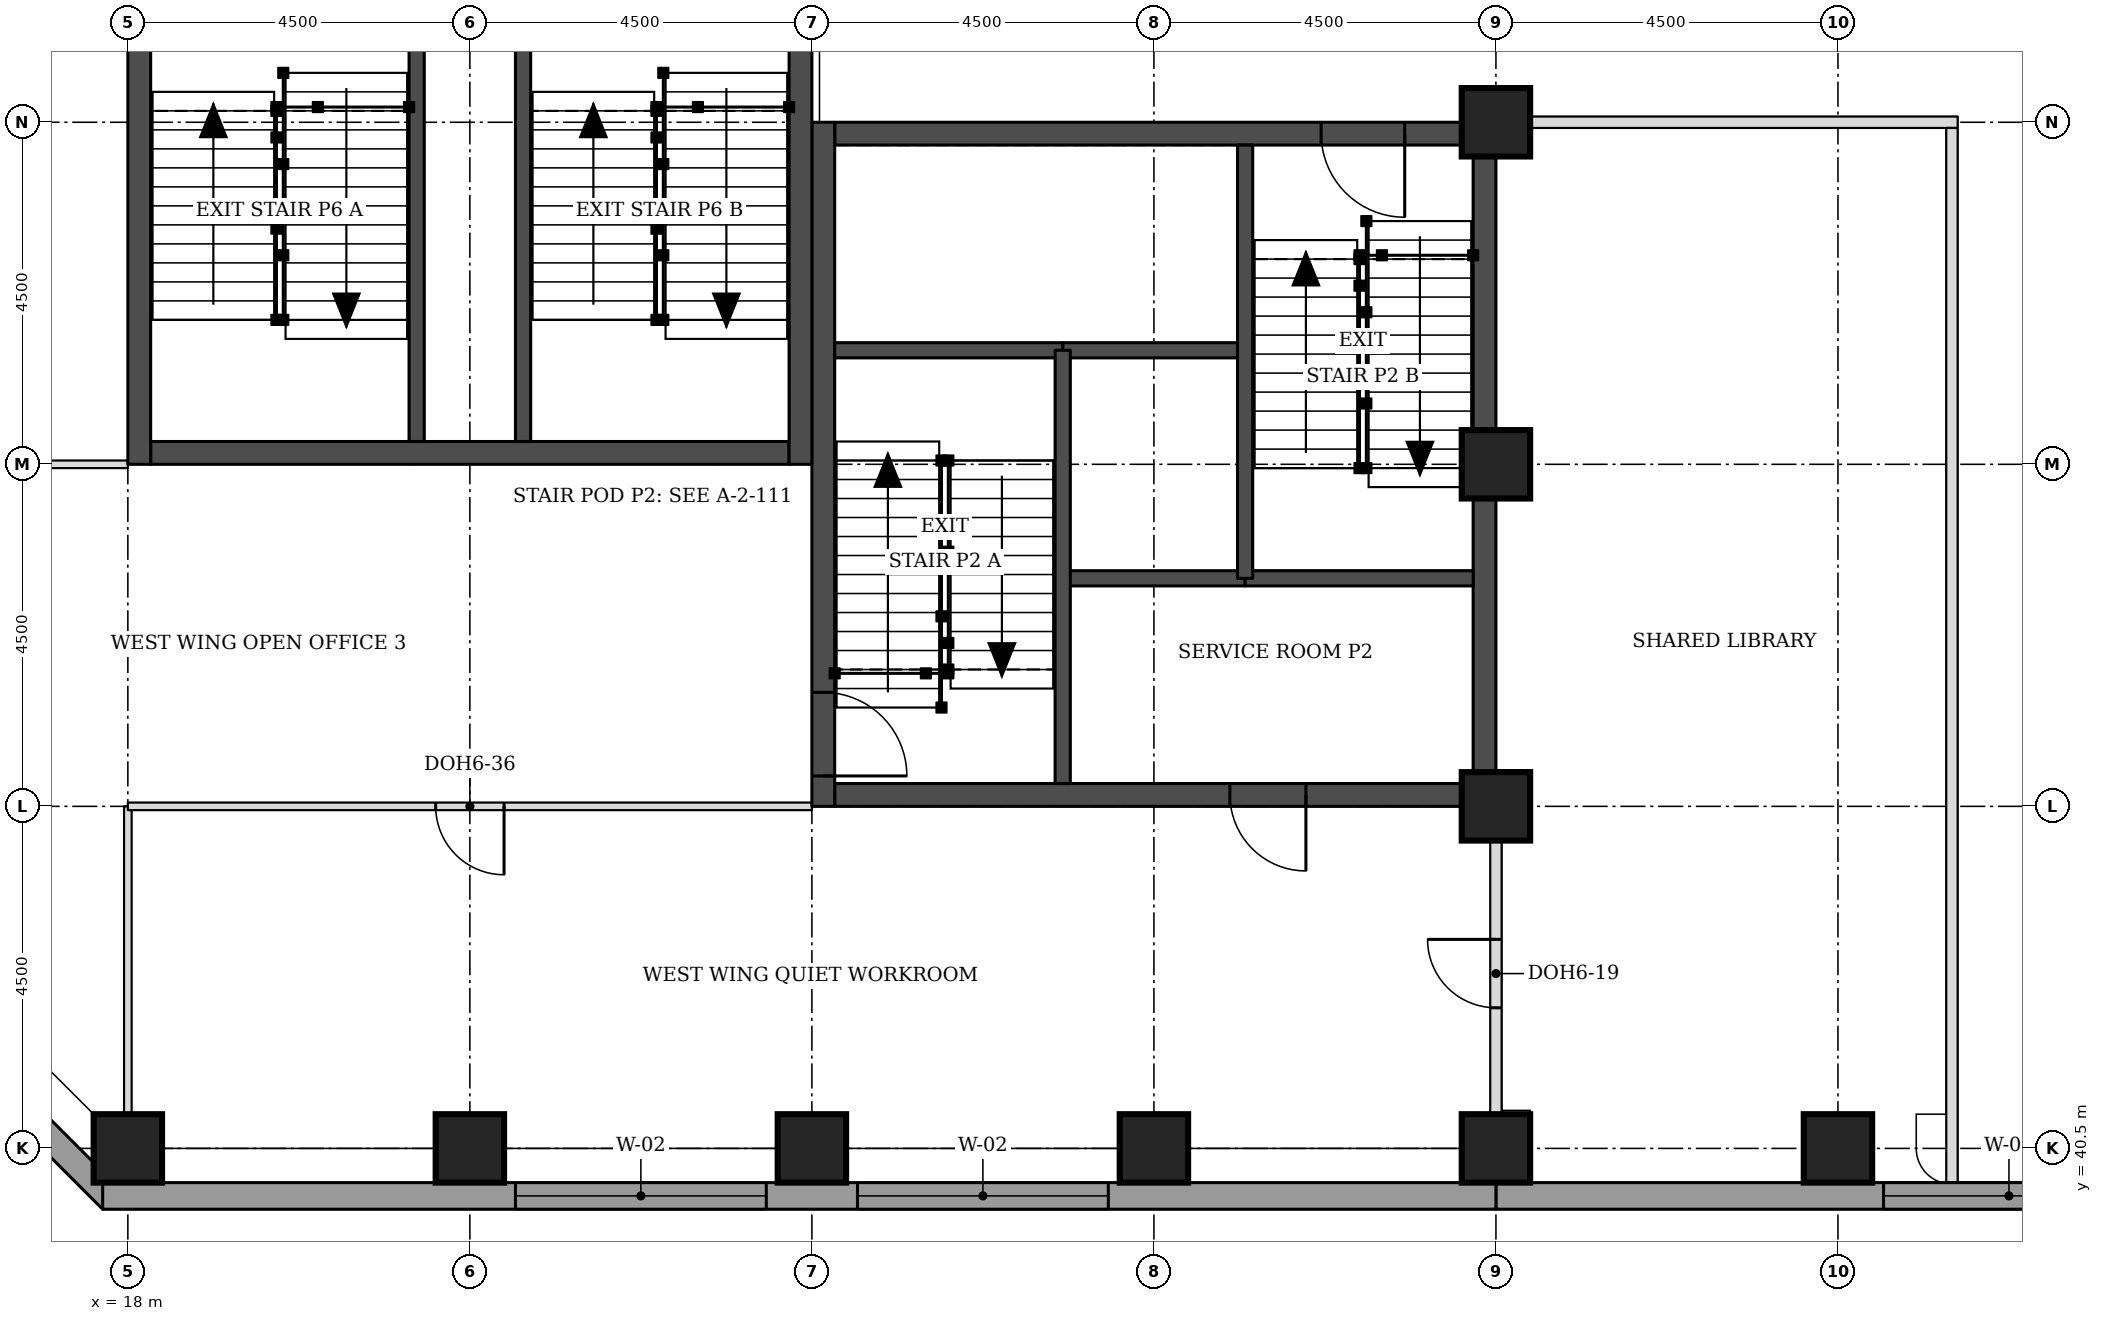
"""IFC4 building model, lengths in metres.
Left out: names, types, materials, properties, quantities, classifications, styles, units other than length and angle.
Written with IfcOpenShell. Run it as: python <this file> out.ifc"""

import sys

from ifc_helpers import new_model, si_unit, direction, frame, frame_2d, origin, origin_2d, place, context, subcontext, project, spatial, rectangle, extrude, element, fill, save


model = new_model("IFC4")
c1 = context("Model", 3, precision=1e-05, world=origin(), true_north=direction((0.0, 1.0)))
c2 = subcontext(c1, "Body", "Model", "MODEL_VIEW")
j1 = project(units=[si_unit("LENGTHUNIT", "METRE"), si_unit("PLANEANGLEUNIT", "RADIAN")], contexts=[c1])
p1 = place(None, origin())
s1 = spatial("IfcSite", under=j1, at=p1, CompositionType="ELEMENT")
p2 = place(p1, origin())
s2 = spatial("IfcBuilding", under=s1, at=p2, CompositionType="ELEMENT")
p3 = place(p2, frame((0.0, 0.0, 184.7)))
s3 = spatial("IfcBuildingStorey", under=s2, at=p3, CompositionType="ELEMENT", Elevation=184.7)
for number, where, z_axis, x_axis in (
    (1, (18.0, 40.5, 0.0), (0.0, 0.0, 1.0), (1.0, 0.0, 0.0)),
    (2, (22.5, 40.5, 0.0), (0.0, 0.0, 1.0), (1.0, 0.0, 0.0)),
    (3, (27.0, 40.5, 0.0), (0.0, 0.0, 1.0), (1.0, 0.0, 0.0)),
    (4, (31.5, 40.5, 0.0), (0.0, 0.0, 1.0), (1.0, 0.0, 0.0)),
    (5, (36.0, 40.5, 0.0), (0.0, 0.0, 1.0), (1.0, 0.0, 0.0)),
    (6, (40.5, 40.5, 0.0), (0.0, 0.0, 1.0), (1.0, 0.0, 0.0)),
    (7, (36.0, 45.0, 0.0), (0.0, 0.0, 1.0), (1.0, 0.0, 0.0)),
    (8, (36.0, 49.5, 0.0), (0.0, 0.0, 1.0), (1.0, 0.0, 0.0)),
    (9, (36.0, 54.0, 0.0), (0.0, 0.0, 1.0), (1.0, 0.0, 0.0)),
):
    element("IfcColumn", number, at=place(p3, frame(where, z_axis=z_axis, x_axis=x_axis)), inside=s3, PredefinedType="COLUMN", context=c2, shape_type="SweptSolid", body=[
        extrude(rectangle(XDim=0.9, YDim=0.9, at=origin_2d()), origin(), (0.0, 0.0, 1.0), 3.7),
    ])
p4 = place(p3, frame((27.3, 45.15, 0.0), z_axis=(0.0, 0.0, 1.0), x_axis=(1.0, 0.0, 0.0)))
e10 = element("IfcWall", 10, at=p4, inside=s3, PredefinedType="SHEAR", context=c2, shape_type="SweptSolid", body=[
    extrude(rectangle(XDim=8.4, YDim=0.3, at=frame_2d((4.2, 0.0))), origin(), (0.0, 0.0, 1.0), 3.7),
])
p5 = place(p4, frame((5.2, 0.0, 0.0)))
e11 = element("IfcOpeningElement", 11, at=p5, cuts=e10, PredefinedType="OPENING", context=c2, shape_type="SweptSolid", body=[
    extrude(rectangle(XDim=1.0, YDim=2.1, at=frame_2d((0.5, 1.05))), frame((0.0, 0.16, 0.0), z_axis=(0.0, -1.0, 0.0), x_axis=(1.0, 0.0, 0.0)), (0.0, 0.0, 1.0), 0.32),
])
p6 = place(p3, frame((27.3, 53.85, 0.0), z_axis=(0.0, 0.0, 1.0), x_axis=(1.0, 0.0, 0.0)))
e12 = element("IfcWall", 12, at=p6, inside=s3, PredefinedType="SHEAR", context=c2, shape_type="SweptSolid", body=[
    extrude(rectangle(XDim=8.4, YDim=0.3, at=frame_2d((4.2, 0.0))), origin(), (0.0, 0.0, 1.0), 3.7),
])
p7 = place(p6, frame((6.4, 0.0, 0.0)))
e13 = element("IfcOpeningElement", 13, at=p7, cuts=e12, PredefinedType="OPENING", context=c2, shape_type="SweptSolid", body=[
    extrude(rectangle(XDim=1.1, YDim=2.1, at=frame_2d((0.55, 1.05))), frame((0.0, 0.16, 0.0), z_axis=(0.0, -1.0, 0.0), x_axis=(1.0, 0.0, 0.0)), (0.0, 0.0, 1.0), 0.32),
])
p8 = place(p3, frame((27.15, 45.0, 0.0), z_axis=(0.0, 0.0, 1.0), x_axis=(0.0, 1.0, 0.0)))
e14 = element("IfcWall", 14, at=p8, inside=s3, PredefinedType="SHEAR", context=c2, shape_type="SweptSolid", body=[
    extrude(rectangle(XDim=9.0, YDim=0.3, at=frame_2d((4.5, 0.0))), origin(), (0.0, 0.0, 1.0), 3.7),
])
p9 = place(p8, frame((0.4, 0.0, 0.0)))
e15 = element("IfcOpeningElement", 15, at=p9, cuts=e14, PredefinedType="OPENING", context=c2, shape_type="SweptSolid", body=[
    extrude(rectangle(XDim=1.1, YDim=2.1, at=frame_2d((0.55, 1.05))), frame((0.0, 0.16, 0.0), z_axis=(0.0, -1.0, 0.0), x_axis=(1.0, 0.0, 0.0)), (0.0, 0.0, 1.0), 0.32),
])
p10 = place(p3, frame((35.85, 45.0, 0.0), z_axis=(0.0, 0.0, 1.0), x_axis=(0.0, 1.0, 0.0)))
e16 = element("IfcWall", 16, at=p10, inside=s3, PredefinedType="SHEAR", context=c2, shape_type="SweptSolid", body=[
    extrude(rectangle(XDim=9.0, YDim=0.3, at=frame_2d((4.5, 0.0))), origin(), (0.0, 0.0, 1.0), 3.7),
])
p11 = place(p3, frame((18.3, 49.65, 0.0), z_axis=(0.0, 0.0, 1.0), x_axis=(1.0, 0.0, 0.0)))
e17 = element("IfcWall", 17, at=p11, inside=s3, PredefinedType="SHEAR", context=c2, shape_type="SweptSolid", body=[
    extrude(rectangle(XDim=8.4, YDim=0.3, at=frame_2d((4.2, 0.0))), origin(), (0.0, 0.0, 1.0), 3.7),
])
p12 = place(p3, frame((18.15, 49.5, 0.0), z_axis=(0.0, 0.0, 1.0), x_axis=(0.0, 1.0, 0.0)))
e18 = element("IfcWall", 18, at=p12, inside=s3, PredefinedType="SHEAR", context=c2, shape_type="SweptSolid", body=[
    extrude(rectangle(XDim=9.0, YDim=0.3, at=frame_2d((4.5, 0.0))), origin(), (0.0, 0.0, 1.0), 3.7),
])
p13 = place(p3, frame((26.85, 49.5, 0.0), z_axis=(0.0, 0.0, 1.0), x_axis=(0.0, 1.0, 0.0)))
e19 = element("IfcWall", 19, at=p13, inside=s3, PredefinedType="SHEAR", context=c2, shape_type="SweptSolid", body=[
    extrude(rectangle(XDim=9.0, YDim=0.3, at=frame_2d((4.5, 0.0))), origin(), (0.0, 0.0, 1.0), 3.7),
])
p14 = place(p13, frame((6.6, 0.0, 0.0)))
e20 = element("IfcOpeningElement", 20, at=p14, cuts=e19, PredefinedType="OPENING", context=c2, shape_type="SweptSolid", body=[
    extrude(rectangle(XDim=1.8, YDim=2.1, at=frame_2d((0.9, 1.05))), frame((0.0, 0.16, 0.0), z_axis=(0.0, -1.0, 0.0), x_axis=(1.0, 0.0, 0.0)), (0.0, 0.0, 1.0), 0.32),
])
p15 = place(p3, frame((36.0, 39.875, 0.0), z_axis=(0.0, 0.0, 1.0), x_axis=(1.0, 0.0, 0.0)))
e21 = element("IfcWall", 21, at=p15, inside=s3, PredefinedType="STANDARD", context=c2, shape_type="SweptSolid", body=[
    extrude(rectangle(XDim=36.331, YDim=0.35, at=frame_2d((18.166, 0.0))), origin(), (0.0, 0.0, 1.0), 3.525),
])
p16 = place(p15, frame((5.1, 0.0, 0.9)))
e22 = element("IfcOpeningElement", 22, at=p16, cuts=e21, PredefinedType="OPENING", context=c2, shape_type="SweptSolid", body=[
    extrude(rectangle(XDim=3.3, YDim=1.9, at=frame_2d((1.65, 0.95))), frame((0.0, 0.185, 0.0), z_axis=(0.0, -1.0, 0.0), x_axis=(1.0, 0.0, 0.0)), (0.0, 0.0, 1.0), 0.37),
])
p17 = place(p15, frame((9.6, 0.0, 0.9)))
e23 = element("IfcOpeningElement", 23, at=p17, cuts=e21, PredefinedType="OPENING", context=c2, shape_type="SweptSolid", body=[
    extrude(rectangle(XDim=3.3, YDim=1.9, at=frame_2d((1.65, 0.95))), frame((0.0, 0.185, 0.0), z_axis=(0.0, -1.0, 0.0), x_axis=(1.0, 0.0, 0.0)), (0.0, 0.0, 1.0), 0.37),
])
p18 = place(p15, frame((14.1, 0.0, 0.9)))
e24 = element("IfcOpeningElement", 24, at=p18, cuts=e21, PredefinedType="OPENING", context=c2, shape_type="SweptSolid", body=[
    extrude(rectangle(XDim=3.3, YDim=1.9, at=frame_2d((1.65, 0.95))), frame((0.0, 0.185, 0.0), z_axis=(0.0, -1.0, 0.0), x_axis=(1.0, 0.0, 0.0)), (0.0, 0.0, 1.0), 0.37),
])
p19 = place(p15, frame((18.6, 0.0, 0.9)))
e25 = element("IfcOpeningElement", 25, at=p19, cuts=e21, PredefinedType="OPENING", context=c2, shape_type="SweptSolid", body=[
    extrude(rectangle(XDim=3.3, YDim=1.9, at=frame_2d((1.65, 0.95))), frame((0.0, 0.185, 0.0), z_axis=(0.0, -1.0, 0.0), x_axis=(1.0, 0.0, 0.0)), (0.0, 0.0, 1.0), 0.37),
])
p20 = place(p15, frame((23.1, 0.0, 0.9)))
e26 = element("IfcOpeningElement", 26, at=p20, cuts=e21, PredefinedType="OPENING", context=c2, shape_type="SweptSolid", body=[
    extrude(rectangle(XDim=3.3, YDim=1.9, at=frame_2d((1.65, 0.95))), frame((0.0, 0.185, 0.0), z_axis=(0.0, -1.0, 0.0), x_axis=(1.0, 0.0, 0.0)), (0.0, 0.0, 1.0), 0.37),
])
p21 = place(p15, frame((27.6, 0.0, 0.9)))
e27 = element("IfcOpeningElement", 27, at=p21, cuts=e21, PredefinedType="OPENING", context=c2, shape_type="SweptSolid", body=[
    extrude(rectangle(XDim=3.3, YDim=1.9, at=frame_2d((1.65, 0.95))), frame((0.0, 0.185, 0.0), z_axis=(0.0, -1.0, 0.0), x_axis=(1.0, 0.0, 0.0)), (0.0, 0.0, 1.0), 0.37),
])
p22 = place(p3, frame((12.824, 44.792, 0.0), z_axis=(0.0, 0.0, 1.0), x_axis=(0.707106781187, -0.707106781187, 0.0)))
e28 = element("IfcWall", 28, at=p22, inside=s3, PredefinedType="STANDARD", context=c2, shape_type="SweptSolid", body=[
    extrude(rectangle(XDim=7.027, YDim=0.35, at=frame_2d((3.513, 0.0))), origin(), (0.0, 0.0, 1.0), 3.525),
])
p23 = place(p22, frame((1.863, 0.0, 0.9)))
e29 = element("IfcOpeningElement", 29, at=p23, cuts=e28, PredefinedType="OPENING", context=c2, shape_type="SweptSolid", body=[
    extrude(rectangle(XDim=3.3, YDim=1.9, at=frame_2d((1.65, 0.95))), frame((0.0, 0.185, 0.0), z_axis=(0.0, -1.0, 0.0), x_axis=(1.0, 0.0, 0.0)), (0.0, 0.0, 1.0), 0.37),
])
p24 = place(p3, frame((17.669, 39.875, 0.0), z_axis=(0.0, 0.0, 1.0), x_axis=(1.0, 0.0, 0.0)))
e30 = element("IfcWall", 30, at=p24, inside=s3, PredefinedType="STANDARD", context=c2, shape_type="SweptSolid", body=[
    extrude(rectangle(XDim=18.331, YDim=0.35, at=frame_2d((9.166, 0.0))), origin(), (0.0, 0.0, 1.0), 3.525),
])
p25 = place(p24, frame((5.431, 0.0, 0.9)))
e31 = element("IfcOpeningElement", 31, at=p25, cuts=e30, PredefinedType="OPENING", context=c2, shape_type="SweptSolid", body=[
    extrude(rectangle(XDim=3.3, YDim=1.9, at=frame_2d((1.65, 0.95))), frame((0.0, 0.185, 0.0), z_axis=(0.0, -1.0, 0.0), x_axis=(1.0, 0.0, 0.0)), (0.0, 0.0, 1.0), 0.37),
])
p26 = place(p24, frame((9.931, 0.0, 0.9)))
e32 = element("IfcOpeningElement", 32, at=p26, cuts=e30, PredefinedType="OPENING", context=c2, shape_type="SweptSolid", body=[
    extrude(rectangle(XDim=3.3, YDim=1.9, at=frame_2d((1.65, 0.95))), frame((0.0, 0.185, 0.0), z_axis=(0.0, -1.0, 0.0), x_axis=(1.0, 0.0, 0.0)), (0.0, 0.0, 1.0), 0.37),
])
p27 = place(p3, frame((36.45, 54.0, 0.0), z_axis=(0.0, 0.0, 1.0), x_axis=(1.0, 0.0, 0.0)))
e33 = element("IfcWall", 33, at=p27, inside=s3, PredefinedType="PARTITIONING", context=c2, shape_type="SweptSolid", body=[
    extrude(rectangle(XDim=5.625, YDim=0.15, at=frame_2d((2.812, 0.0))), origin(), (0.0, 0.0, 1.0), 3.55),
])
p28 = place(p3, frame((42.0, 40.05, 0.0), z_axis=(0.0, 0.0, 1.0), x_axis=(0.0, 1.0, 0.0)))
e34 = element("IfcWall", 34, at=p28, inside=s3, PredefinedType="PARTITIONING", context=c2, shape_type="SweptSolid", body=[
    extrude(rectangle(XDim=13.875, YDim=0.15, at=frame_2d((6.938, 0.0))), origin(), (0.0, 0.0, 1.0), 3.55),
])
p29 = place(p3, frame((36.0, 40.95, 0.0), z_axis=(0.0, 0.0, 1.0), x_axis=(0.0, 1.0, 0.0)))
e35 = element("IfcWall", 35, at=p29, inside=s3, PredefinedType="PARTITIONING", context=c2, shape_type="SweptSolid", body=[
    extrude(rectangle(XDim=3.63, YDim=0.15, at=frame_2d((1.815, 0.0))), origin(), (0.0, 0.0, 1.0), 2.8),
])
p30 = place(p29, frame((1.4, 0.0, 0.0)))
e36 = element("IfcOpeningElement", 36, at=p30, cuts=e35, PredefinedType="OPENING", context=c2, shape_type="SweptSolid", body=[
    extrude(rectangle(XDim=0.9, YDim=2.1, at=frame_2d((0.45, 1.05))), frame((0.0, 0.085, 0.0), z_axis=(0.0, -1.0, 0.0), x_axis=(1.0, 0.0, 0.0)), (0.0, 0.0, 1.0), 0.17),
])
p31 = place(p3, frame((13.5, 49.5, 0.0), z_axis=(0.0, 0.0, 1.0), x_axis=(1.0, 0.0, 0.0)))
e37 = element("IfcWall", 37, at=p31, inside=s3, PredefinedType="PARTITIONING", context=c2, shape_type="SweptSolid", body=[
    extrude(rectangle(XDim=4.5, YDim=0.1, at=frame_2d((2.25, 0.0))), origin(), (0.0, 0.0, 1.0), 3.55),
])
p32 = place(p31, frame((1.8, 0.0, 0.0)))
e38 = element("IfcOpeningElement", 38, at=p32, cuts=e37, PredefinedType="OPENING", context=c2, shape_type="SweptSolid", body=[
    extrude(rectangle(XDim=0.9, YDim=2.1, at=frame_2d((0.45, 1.05))), frame((0.0, 0.06, 0.0), z_axis=(0.0, -1.0, 0.0), x_axis=(1.0, 0.0, 0.0)), (0.0, 0.0, 1.0), 0.12),
])
p33 = place(p3, frame((18.0, 40.5, 0.0), z_axis=(0.0, 0.0, 1.0), x_axis=(0.0, 1.0, 0.0)))
e39 = element("IfcWall", 39, at=p33, inside=s3, PredefinedType="PARTITIONING", context=c2, shape_type="SweptSolid", body=[
    extrude(rectangle(XDim=4.5, YDim=0.1, at=frame_2d((2.25, 0.0))), origin(), (0.0, 0.0, 1.0), 3.55),
])
p34 = place(p3, frame((18.0, 45.0, 0.0), z_axis=(0.0, 0.0, 1.0), x_axis=(1.0, 0.0, 0.0)))
e40 = element("IfcWall", 40, at=p34, inside=s3, PredefinedType="PARTITIONING", context=c2, shape_type="SweptSolid", body=[
    extrude(rectangle(XDim=9.0, YDim=0.1, at=frame_2d((4.5, 0.0))), origin(), (0.0, 0.0, 1.0), 2.55),
])
p35 = place(p34, frame((4.05, 0.0, 0.0)))
e41 = element("IfcOpeningElement", 41, at=p35, cuts=e40, PredefinedType="OPENING", context=c2, shape_type="SweptSolid", body=[
    extrude(rectangle(XDim=0.9, YDim=2.1, at=frame_2d((0.45, 1.05))), frame((0.0, 0.06, 0.0), z_axis=(0.0, -1.0, 0.0), x_axis=(1.0, 0.0, 0.0)), (0.0, 0.0, 1.0), 0.12),
])
p36 = place(p3, frame((30.3, 48.0, 0.0), z_axis=(0.0, 0.0, 1.0), x_axis=(1.0, 0.0, 0.0)))
e42 = element("IfcWall", 42, at=p36, inside=s3, PredefinedType="SOLIDWALL", context=c2, shape_type="SweptSolid", body=[
    extrude(rectangle(XDim=2.4, YDim=0.2, at=frame_2d((1.2, 0.0))), origin(), (0.0, 0.0, 1.0), 3.55),
])
p37 = place(p3, frame((32.7, 48.0, 0.0), z_axis=(0.0, 0.0, 1.0), x_axis=(1.0, 0.0, 0.0)))
e43 = element("IfcWall", 43, at=p37, inside=s3, PredefinedType="SOLIDWALL", context=c2, shape_type="SweptSolid", body=[
    extrude(rectangle(XDim=3.0, YDim=0.2, at=frame_2d((1.5, 0.0))), origin(), (0.0, 0.0, 1.0), 3.55),
])
p38 = place(p3, frame((30.3, 51.0, 0.0), z_axis=(0.0, 0.0, 1.0), x_axis=(1.0, 0.0, 0.0)))
e44 = element("IfcWall", 44, at=p38, inside=s3, PredefinedType="SOLIDWALL", context=c2, shape_type="SweptSolid", body=[
    extrude(rectangle(XDim=2.4, YDim=0.2, at=frame_2d((1.2, 0.0))), origin(), (0.0, 0.0, 1.0), 3.7),
])
p39 = place(p3, frame((27.3, 51.0, 0.0), z_axis=(0.0, 0.0, 1.0), x_axis=(1.0, 0.0, 0.0)))
e45 = element("IfcWall", 45, at=p39, inside=s3, PredefinedType="SOLIDWALL", context=c2, shape_type="SweptSolid", body=[
    extrude(rectangle(XDim=3.0, YDim=0.2, at=frame_2d((1.5, 0.0))), origin(), (0.0, 0.0, 1.0), 3.55),
])
for number, where, z_axis, x_axis in (
    (46, (30.3, 45.3, 0.0), (0.0, 0.0, 1.0), (0.0, 1.0, 0.0)),
    (47, (32.7, 48.0, 0.0), (0.0, 0.0, 1.0), (0.0, 1.0, 0.0)),
):
    element("IfcWall", number, at=place(p3, frame(where, z_axis=z_axis, x_axis=x_axis)), inside=s3, PredefinedType="SOLIDWALL", context=c2, shape_type="SweptSolid", body=[
        extrude(rectangle(XDim=5.7, YDim=0.2, at=frame_2d((2.85, 0.0))), origin(), (0.0, 0.0, 1.0), 3.55),
    ])
for number, where, z_axis, x_axis in (
    (48, (21.8, 49.8, 0.0), (0.0, 0.0, 1.0), (0.0, 1.0, 0.0)),
    (49, (23.2, 49.8, 0.0), (0.0, 0.0, 1.0), (0.0, 1.0, 0.0)),
):
    element("IfcWall", number, at=place(p3, frame(where, z_axis=z_axis, x_axis=x_axis)), inside=s3, PredefinedType="SOLIDWALL", context=c2, shape_type="SweptSolid", body=[
        extrude(rectangle(XDim=6.05, YDim=0.2, at=frame_2d((3.025, 0.0))), origin(), (0.0, 0.0, 1.0), 3.55),
    ])
p40 = place(p16, origin())
e50 = element("IfcWindow", 50, at=p40, inside=s3, PartitioningType="SINGLE_PANEL", PredefinedType="WINDOW", context=c2, shape_type="SweptSolid", body=[
    extrude(rectangle(XDim=3.3, YDim=1.9, at=frame_2d((1.65, 0.95))), frame((0.0, 0.085, 0.0), z_axis=(0.0, -1.0, 0.0), x_axis=(1.0, 0.0, 0.0)), (0.0, 0.0, 1.0), 0.06),
])
fill(e22, e50)
p41 = place(p25, origin())
e51 = element("IfcWindow", 51, at=p41, inside=s3, PartitioningType="SINGLE_PANEL", PredefinedType="WINDOW", context=c2, shape_type="SweptSolid", body=[
    extrude(rectangle(XDim=3.3, YDim=1.9, at=frame_2d((1.65, 0.95))), frame((0.0, 0.085, 0.0), z_axis=(0.0, -1.0, 0.0), x_axis=(1.0, 0.0, 0.0)), (0.0, 0.0, 1.0), 0.06),
])
fill(e31, e51)
p42 = place(p26, origin())
e52 = element("IfcWindow", 52, at=p42, inside=s3, PartitioningType="SINGLE_PANEL", PredefinedType="WINDOW", context=c2, shape_type="SweptSolid", body=[
    extrude(rectangle(XDim=3.3, YDim=1.9, at=frame_2d((1.65, 0.95))), frame((0.0, 0.085, 0.0), z_axis=(0.0, -1.0, 0.0), x_axis=(1.0, 0.0, 0.0)), (0.0, 0.0, 1.0), 0.06),
])
fill(e32, e52)
p43 = place(p30, origin())
e53 = element("IfcDoor", 53, at=p43, inside=s3, OperationType="SINGLE_SWING_RIGHT", PredefinedType="DOOR", context=c2, shape_type="SweptSolid", body=[
    extrude(rectangle(XDim=0.9, YDim=2.1, at=frame_2d((0.45, 1.05))), frame((0.0, 0.025, 0.0), z_axis=(0.0, -1.0, 0.0), x_axis=(1.0, 0.0, 0.0)), (0.0, 0.0, 1.0), 0.05),
])
fill(e36, e53)
p44 = place(p35, frame((0.9, 0.0, 0.0), z_axis=(0.0, 0.0, 1.0), x_axis=(-1.0, 0.0, 0.0)))
e54 = element("IfcDoor", 54, at=p44, inside=s3, OperationType="SINGLE_SWING_LEFT", PredefinedType="DOOR", context=c2, shape_type="SweptSolid", body=[
    extrude(rectangle(XDim=0.9, YDim=2.1, at=frame_2d((0.45, 1.05))), frame((0.0, 0.025, 0.0), z_axis=(0.0, -1.0, 0.0), x_axis=(1.0, 0.0, 0.0)), (0.0, 0.0, 1.0), 0.05),
])
fill(e41, e54)
p45 = place(p9, frame((1.1, 0.0, 0.0), z_axis=(0.0, 0.0, 1.0), x_axis=(-1.0, 0.0, 0.0)))
e55 = element("IfcDoor", 55, at=p45, inside=s3, OperationType="SINGLE_SWING_RIGHT", PredefinedType="DOOR", context=c2, shape_type="SweptSolid", body=[
    extrude(rectangle(XDim=1.1, YDim=2.1, at=frame_2d((0.55, 1.05))), frame((0.0, 0.025, 0.0), z_axis=(0.0, -1.0, 0.0), x_axis=(1.0, 0.0, 0.0)), (0.0, 0.0, 1.0), 0.05),
])
fill(e15, e55)
p46 = place(p7, frame((1.1, 0.0, 0.0), z_axis=(0.0, 0.0, 1.0), x_axis=(-1.0, 0.0, 0.0)))
e56 = element("IfcDoor", 56, at=p46, inside=s3, OperationType="SINGLE_SWING_LEFT", PredefinedType="DOOR", context=c2, shape_type="SweptSolid", body=[
    extrude(rectangle(XDim=1.1, YDim=2.1, at=frame_2d((0.55, 1.05))), frame((0.0, 0.025, 0.0), z_axis=(0.0, -1.0, 0.0), x_axis=(1.0, 0.0, 0.0)), (0.0, 0.0, 1.0), 0.05),
])
fill(e13, e56)
p47 = place(p5, frame((1.0, 0.0, 0.0), z_axis=(0.0, 0.0, 1.0), x_axis=(-1.0, 0.0, 0.0)))
e57 = element("IfcDoor", 57, at=p47, inside=s3, OperationType="SINGLE_SWING_LEFT", PredefinedType="DOOR", context=c2, shape_type="SweptSolid", body=[
    extrude(rectangle(XDim=1.0, YDim=2.1, at=frame_2d((0.5, 1.05))), frame((0.0, 0.025, 0.0), z_axis=(0.0, -1.0, 0.0), x_axis=(1.0, 0.0, 0.0)), (0.0, 0.0, 1.0), 0.05),
])
fill(e11, e57)
save(model, sys.argv[1])
